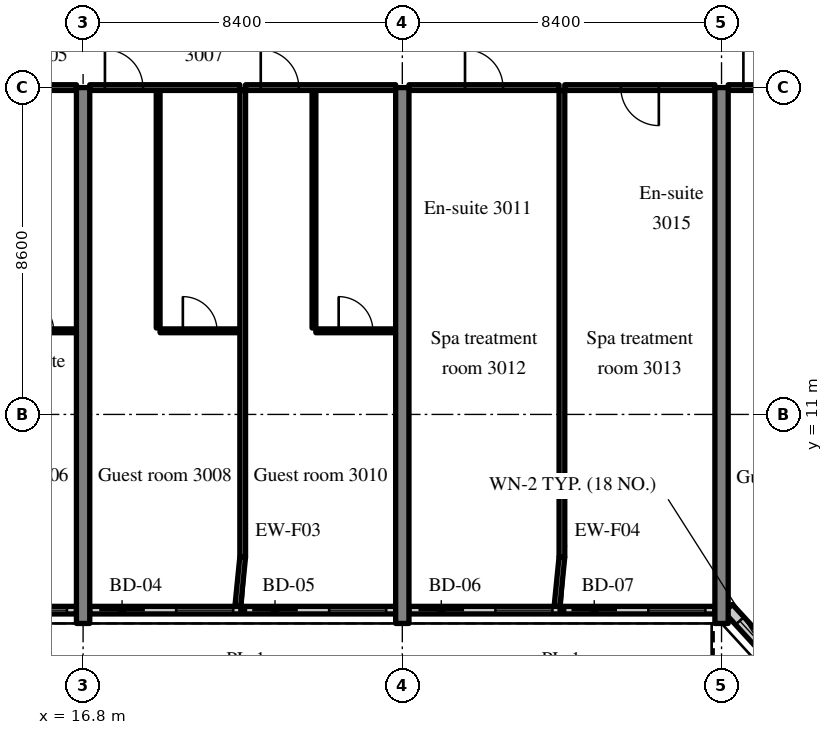
"""IFC4 building model, lengths in metres.
Left out: names, types, materials, properties, quantities, classifications, styles, units other than length and angle.
Written with IfcOpenShell. Run it as: python <this file> out.ifc"""

import sys

from ifc_helpers import new_model, si_unit, direction, frame, frame_2d, origin, place, context, subcontext, project, spatial, rectangle, extrude, source, transform, mapped, element, fill, save


model = new_model("IFC4")
c1 = context("Model", 3, precision=1e-05, world=origin(), true_north=direction((0.0, 1.0)))
c2 = subcontext(c1, "Body", "Model", "MODEL_VIEW")
j1 = project(units=[si_unit("LENGTHUNIT", "METRE"), si_unit("PLANEANGLEUNIT", "RADIAN")], contexts=[c1])
p1 = place(None, origin())
s1 = spatial("IfcSite", under=j1, at=p1, CompositionType="ELEMENT")
p2 = place(p1, origin())
s2 = spatial("IfcBuilding", under=s1, at=p2, CompositionType="ELEMENT")
p3 = place(p2, frame((0.0, 0.0, 125.6)))
s3 = spatial("IfcBuildingStorey", under=s2, at=p3, CompositionType="ELEMENT", Elevation=125.6)
m1 = source(origin(), c2, "Body", "SweptSolid", [
    extrude(rectangle(XDim=14.1, YDim=0.35, at=frame_2d((7.05, 0.0))), origin(), (0.0, 0.0, 1.0), 3.52),
])
for number, where, z_axis, x_axis in (
    (1, (16.8, 5.5, 0.0), (0.0, 0.0, 1.0), (0.0, 1.0, 0.0)),
    (2, (25.2, 5.5, 0.0), (0.0, 0.0, 1.0), (0.0, 1.0, 0.0)),
    (3, (33.6, 5.5, 0.0), (0.0, 0.0, 1.0), (0.0, 1.0, 0.0)),
):
    element("IfcWall", number, at=place(p3, frame(where, z_axis=z_axis, x_axis=x_axis)), inside=s3, PredefinedType="SHEAR", context=c2, shape_type="MappedRepresentation", body=[
        mapped(m1, transform((0.0, 0.0, 0.0), scale=1.0)),
    ])
m2 = source(origin(), c2, "Body", "SweptSolid", [
    extrude(rectangle(XDim=8.05, YDim=0.2, at=frame_2d((4.025, 0.0))), origin(), (0.0, 0.0, 1.0), 2.82),
])
p4 = place(p3, frame((8.575, 5.85, 0.0), z_axis=(0.0, 0.0, 1.0), x_axis=(1.0, 0.0, 0.0)))
e4 = element("IfcWall", 4, at=p4, inside=s3, PredefinedType="SOLIDWALL", context=c2, shape_type="MappedRepresentation", body=[
    mapped(m2, transform((0.0, 0.0, 0.0), scale=1.0)),
])
m3 = source(origin(), c2, "Body", "SweptSolid", [
    extrude(rectangle(XDim=1.2, YDim=2.4, at=frame_2d((0.6, 1.2))), frame((0.0, 0.11, 0.0), z_axis=(0.0, -1.0, 0.0), x_axis=(1.0, 0.0, 0.0)), (0.0, 0.0, 1.0), 0.22),
])
p5 = place(p4, frame((0.25, 0.0, 0.0)))
e5 = element("IfcOpeningElement", 5, at=p5, cuts=e4, PredefinedType="OPENING", context=c2, shape_type="MappedRepresentation", body=[
    mapped(m3, transform((0.0, 0.0, 0.0), scale=1.0)),
])
m4 = source(origin(), c2, "Body", "SweptSolid", [
    extrude(rectangle(XDim=1.5, YDim=1.5, at=frame_2d((0.75, 0.75))), frame((0.0, 0.11, 0.0), z_axis=(0.0, -1.0, 0.0), x_axis=(1.0, 0.0, 0.0)), (0.0, 0.0, 1.0), 0.22),
])
p6 = place(p4, frame((2.275, 0.0, 0.9)))
e6 = element("IfcOpeningElement", 6, at=p6, cuts=e4, PredefinedType="OPENING", context=c2, shape_type="MappedRepresentation", body=[
    mapped(m4, transform((0.0, 0.0, 0.0), scale=1.0)),
])
p7 = place(p4, frame((4.275, 0.0, 0.0)))
e7 = element("IfcOpeningElement", 7, at=p7, cuts=e4, PredefinedType="OPENING", context=c2, shape_type="MappedRepresentation", body=[
    mapped(m3, transform((0.0, 0.0, 0.0), scale=1.0)),
])
p8 = place(p4, frame((6.3, 0.0, 0.9)))
e8 = element("IfcOpeningElement", 8, at=p8, cuts=e4, PredefinedType="OPENING", context=c2, shape_type="MappedRepresentation", body=[
    mapped(m4, transform((0.0, 0.0, 0.0), scale=1.0)),
])
m5 = source(origin(), c2, "Body", "SweptSolid", [
    extrude(rectangle(XDim=8.05, YDim=0.2, at=frame_2d((4.025, 0.0))), origin(), (0.0, 0.0, 1.0), 2.82),
])
p9 = place(p3, frame((16.975, 5.85, 0.0), z_axis=(0.0, 0.0, 1.0), x_axis=(1.0, 0.0, 0.0)))
e9 = element("IfcWall", 9, at=p9, inside=s3, PredefinedType="SOLIDWALL", context=c2, shape_type="MappedRepresentation", body=[
    mapped(m5, transform((0.0, 0.0, 0.0), scale=1.0)),
])
p10 = place(p9, frame((0.25, 0.0, 0.0)))
e10 = element("IfcOpeningElement", 10, at=p10, cuts=e9, PredefinedType="OPENING", context=c2, shape_type="MappedRepresentation", body=[
    mapped(m3, transform((0.0, 0.0, 0.0), scale=1.0)),
])
p11 = place(p9, frame((2.275, 0.0, 0.9)))
e11 = element("IfcOpeningElement", 11, at=p11, cuts=e9, PredefinedType="OPENING", context=c2, shape_type="MappedRepresentation", body=[
    mapped(m4, transform((0.0, 0.0, 0.0), scale=1.0)),
])
p12 = place(p9, frame((4.275, 0.0, 0.0)))
e12 = element("IfcOpeningElement", 12, at=p12, cuts=e9, PredefinedType="OPENING", context=c2, shape_type="MappedRepresentation", body=[
    mapped(m3, transform((0.0, 0.0, 0.0), scale=1.0)),
])
p13 = place(p9, frame((6.3, 0.0, 0.9)))
e13 = element("IfcOpeningElement", 13, at=p13, cuts=e9, PredefinedType="OPENING", context=c2, shape_type="MappedRepresentation", body=[
    mapped(m4, transform((0.0, 0.0, 0.0), scale=1.0)),
])
p14 = place(p3, frame((25.375, 5.85, 0.0), z_axis=(0.0, 0.0, 1.0), x_axis=(1.0, 0.0, 0.0)))
e14 = element("IfcWall", 14, at=p14, inside=s3, PredefinedType="SOLIDWALL", context=c2, shape_type="MappedRepresentation", body=[
    mapped(m2, transform((0.0, 0.0, 0.0), scale=1.0)),
])
p15 = place(p14, frame((0.25, 0.0, 0.0)))
e15 = element("IfcOpeningElement", 15, at=p15, cuts=e14, PredefinedType="OPENING", context=c2, shape_type="MappedRepresentation", body=[
    mapped(m3, transform((0.0, 0.0, 0.0), scale=1.0)),
])
p16 = place(p14, frame((2.275, 0.0, 0.9)))
e16 = element("IfcOpeningElement", 16, at=p16, cuts=e14, PredefinedType="OPENING", context=c2, shape_type="MappedRepresentation", body=[
    mapped(m4, transform((0.0, 0.0, 0.0), scale=1.0)),
])
p17 = place(p14, frame((4.275, 0.0, 0.0)))
e17 = element("IfcOpeningElement", 17, at=p17, cuts=e14, PredefinedType="OPENING", context=c2, shape_type="MappedRepresentation", body=[
    mapped(m3, transform((0.0, 0.0, 0.0), scale=1.0)),
])
p18 = place(p14, frame((6.3, 0.0, 0.9)))
e18 = element("IfcOpeningElement", 18, at=p18, cuts=e14, PredefinedType="OPENING", context=c2, shape_type="MappedRepresentation", body=[
    mapped(m4, transform((0.0, 0.0, 0.0), scale=1.0)),
])
m6 = source(origin(), c2, "Body", "SweptSolid", [
    extrude(rectangle(XDim=2.398, YDim=0.3, at=frame_2d((1.199, 0.0))), origin(), (0.0, 0.0, 1.0), 3.52),
])
p19 = place(p3, frame((33.776, 5.9, 0.0), z_axis=(0.0, 0.0, 1.0), x_axis=(0.675374189419, -0.737475222815, 0.0)))
e19 = element("IfcWall", 19, at=p19, inside=s3, PredefinedType="SOLIDWALL", context=c2, shape_type="MappedRepresentation", body=[
    mapped(m6, transform((0.0, 0.0, 0.0), scale=1.0)),
])
m7 = source(origin(), c2, "Body", "SweptSolid", [
    extrude(rectangle(XDim=1.5, YDim=2.0, at=frame_2d((0.75, 1.0))), frame((0.0, 0.16, 0.0), z_axis=(0.0, -1.0, 0.0), x_axis=(1.0, 0.0, 0.0)), (0.0, 0.0, 1.0), 0.32),
])
p20 = place(p19, frame((0.449, 0.0, 0.9)))
e20 = element("IfcOpeningElement", 20, at=p20, cuts=e19, PredefinedType="OPENING", context=c2, shape_type="MappedRepresentation", body=[
    mapped(m7, transform((0.0, 0.0, 0.0), scale=1.0)),
])
m8 = source(origin(), c2, "Body", "SweptSolid", [
    extrude(rectangle(XDim=2.1, YDim=0.1, at=frame_2d((1.05, 0.0))), origin(), (0.0, 0.0, 1.0), 3.52),
])
p21 = place(p3, frame((14.525, 13.2, 0.0), z_axis=(0.0, 0.0, 1.0), x_axis=(1.0, 0.0, 0.0)))
e21 = element("IfcWall", 21, at=p21, inside=s3, PredefinedType="PARTITIONING", context=c2, shape_type="MappedRepresentation", body=[
    mapped(m8, transform((0.0, 0.0, 0.0), scale=1.0)),
])
m9 = source(origin(), c2, "Body", "SweptSolid", [
    extrude(rectangle(XDim=0.9, YDim=2.1, at=frame_2d((0.45, 1.05))), frame((0.0, 0.06, 0.0), z_axis=(0.0, -1.0, 0.0), x_axis=(1.0, 0.0, 0.0)), (0.0, 0.0, 1.0), 0.12),
])
p22 = place(p21, frame((0.6, 0.0, 0.0)))
e22 = element("IfcOpeningElement", 22, at=p22, cuts=e21, PredefinedType="OPENING", context=c2, shape_type="MappedRepresentation", body=[
    mapped(m9, transform((0.0, 0.0, 0.0), scale=1.0)),
])
m10 = source(origin(), c2, "Body", "SweptSolid", [
    extrude(rectangle(XDim=3.95, YDim=0.15, at=frame_2d((1.975, 0.0))), origin(), (0.0, 0.0, 1.0), 2.82),
])
p23 = place(p3, frame((12.675, 19.6, 0.0), z_axis=(0.0, 0.0, 1.0), x_axis=(1.0, 0.0, 0.0)))
e23 = element("IfcWall", 23, at=p23, inside=s3, PredefinedType="PARTITIONING", context=c2, shape_type="MappedRepresentation", body=[
    mapped(m10, transform((0.0, 0.0, 0.0), scale=1.0)),
])
m11 = source(origin(), c2, "Body", "SweptSolid", [
    extrude(rectangle(XDim=1.0, YDim=2.1, at=frame_2d((0.5, 1.05))), frame((0.0, 0.085, 0.0), z_axis=(0.0, -1.0, 0.0), x_axis=(1.0, 0.0, 0.0)), (0.0, 0.0, 1.0), 0.17),
])
p24 = place(p23, frame((0.4, 0.0, 0.0)))
e24 = element("IfcOpeningElement", 24, at=p24, cuts=e23, PredefinedType="OPENING", context=c2, shape_type="MappedRepresentation", body=[
    mapped(m11, transform((0.0, 0.0, 0.0), scale=1.0)),
])
m12 = source(origin(), c2, "Body", "SweptSolid", [
    extrude(rectangle(XDim=6.25, YDim=0.1, at=frame_2d((3.125, 0.0))), origin(), (0.0, 0.0, 1.0), 3.52),
])
p25 = place(p3, frame((18.775, 13.275, 0.0), z_axis=(0.0, 0.0, 1.0), x_axis=(0.0, 1.0, 0.0)))
e25 = element("IfcWall", 25, at=p25, inside=s3, PredefinedType="PARTITIONING", context=c2, shape_type="MappedRepresentation", body=[
    mapped(m12, transform((0.0, 0.0, 0.0), scale=1.0)),
])
p26 = place(p3, frame((18.825, 13.2, 0.0), z_axis=(0.0, 0.0, 1.0), x_axis=(1.0, 0.0, 0.0)))
e26 = element("IfcWall", 26, at=p26, inside=s3, PredefinedType="PARTITIONING", context=c2, shape_type="MappedRepresentation", body=[
    mapped(m8, transform((0.0, 0.0, 0.0), scale=1.0)),
])
p27 = place(p26, frame((0.6, 0.0, 0.0)))
e27 = element("IfcOpeningElement", 27, at=p27, cuts=e26, PredefinedType="OPENING", context=c2, shape_type="MappedRepresentation", body=[
    mapped(m9, transform((0.0, 0.0, 0.0), scale=1.0)),
])
p28 = place(p3, frame((16.975, 19.6, 0.0), z_axis=(0.0, 0.0, 1.0), x_axis=(1.0, 0.0, 0.0)))
e28 = element("IfcWall", 28, at=p28, inside=s3, PredefinedType="PARTITIONING", context=c2, shape_type="MappedRepresentation", body=[
    mapped(m10, transform((0.0, 0.0, 0.0), scale=1.0)),
])
p29 = place(p28, frame((0.4, 0.0, 0.0)))
e29 = element("IfcOpeningElement", 29, at=p29, cuts=e28, PredefinedType="OPENING", context=c2, shape_type="MappedRepresentation", body=[
    mapped(m11, transform((0.0, 0.0, 0.0), scale=1.0)),
])
p30 = place(p3, frame((22.875, 13.275, 0.0), z_axis=(0.0, 0.0, 1.0), x_axis=(0.0, 1.0, 0.0)))
e30 = element("IfcWall", 30, at=p30, inside=s3, PredefinedType="PARTITIONING", context=c2, shape_type="MappedRepresentation", body=[
    mapped(m12, transform((0.0, 0.0, 0.0), scale=1.0)),
])
m13 = source(origin(), c2, "Body", "SweptSolid", [
    extrude(rectangle(XDim=2.1, YDim=0.1, at=frame_2d((1.05, 0.0))), origin(), (0.0, 0.0, 1.0), 3.52),
])
p31 = place(p3, frame((22.925, 13.2, 0.0), z_axis=(0.0, 0.0, 1.0), x_axis=(1.0, 0.0, 0.0)))
e31 = element("IfcWall", 31, at=p31, inside=s3, PredefinedType="PARTITIONING", context=c2, shape_type="MappedRepresentation", body=[
    mapped(m13, transform((0.0, 0.0, 0.0), scale=1.0)),
])
p32 = place(p31, frame((0.6, 0.0, 0.0)))
e32 = element("IfcOpeningElement", 32, at=p32, cuts=e31, PredefinedType="OPENING", context=c2, shape_type="MappedRepresentation", body=[
    mapped(m9, transform((0.0, 0.0, 0.0), scale=1.0)),
])
p33 = place(p3, frame((21.075, 19.6, 0.0), z_axis=(0.0, 0.0, 1.0), x_axis=(1.0, 0.0, 0.0)))
e33 = element("IfcWall", 33, at=p33, inside=s3, PredefinedType="PARTITIONING", context=c2, shape_type="MappedRepresentation", body=[
    mapped(m10, transform((0.0, 0.0, 0.0), scale=1.0)),
])
p34 = place(p33, frame((0.4, 0.0, 0.0)))
e34 = element("IfcOpeningElement", 34, at=p34, cuts=e33, PredefinedType="OPENING", context=c2, shape_type="MappedRepresentation", body=[
    mapped(m11, transform((0.0, 0.0, 0.0), scale=1.0)),
])
m14 = source(origin(), c2, "Body", "SweptSolid", [
    extrude(rectangle(XDim=12.275, YDim=0.15, at=frame_2d((6.137, 0.0))), origin(), (0.0, 0.0, 1.0), 3.52),
])
p35 = place(p3, frame((21.0, 7.25, 0.0), z_axis=(0.0, 0.0, 1.0), x_axis=(0.0, 1.0, 0.0)))
e35 = element("IfcWall", 35, at=p35, inside=s3, PredefinedType="PARTITIONING", context=c2, shape_type="MappedRepresentation", body=[
    mapped(m14, transform((0.0, 0.0, 0.0), scale=1.0)),
])
p36 = place(p3, frame((25.375, 19.6, 0.0), z_axis=(0.0, 0.0, 1.0), x_axis=(1.0, 0.0, 0.0)))
e36 = element("IfcWall", 36, at=p36, inside=s3, PredefinedType="PARTITIONING", context=c2, shape_type="MappedRepresentation", body=[
    mapped(m10, transform((0.0, 0.0, 0.0), scale=1.0)),
])
p37 = place(p36, frame((1.475, 0.0, 0.0)))
e37 = element("IfcOpeningElement", 37, at=p37, cuts=e36, PredefinedType="OPENING", context=c2, shape_type="MappedRepresentation", body=[
    mapped(m11, transform((0.0, 0.0, 0.0), scale=1.0)),
])
p38 = place(p3, frame((29.475, 19.6, 0.0), z_axis=(0.0, 0.0, 1.0), x_axis=(1.0, 0.0, 0.0)))
e38 = element("IfcWall", 38, at=p38, inside=s3, PredefinedType="PARTITIONING", context=c2, shape_type="MappedRepresentation", body=[
    mapped(m10, transform((0.0, 0.0, 0.0), scale=1.0)),
])
p39 = place(p38, frame((1.475, 0.0, 0.0)))
e39 = element("IfcOpeningElement", 39, at=p39, cuts=e38, PredefinedType="OPENING", context=c2, shape_type="MappedRepresentation", body=[
    mapped(m11, transform((0.0, 0.0, 0.0), scale=1.0)),
])
p40 = place(p3, frame((29.4, 7.25, 0.0), z_axis=(0.0, 0.0, 1.0), x_axis=(0.0, 1.0, 0.0)))
e40 = element("IfcWall", 40, at=p40, inside=s3, PredefinedType="PARTITIONING", context=c2, shape_type="MappedRepresentation", body=[
    mapped(m14, transform((0.0, 0.0, 0.0), scale=1.0)),
])
m15 = source(origin(), c2, "Body", "SweptSolid", [
    extrude(rectangle(XDim=3.95, YDim=0.15, at=frame_2d((1.975, 0.0))), origin(), (0.0, 0.0, 1.0), 2.82),
])
p41 = place(p3, frame((33.775, 19.6, 0.0), z_axis=(0.0, 0.0, 1.0), x_axis=(1.0, 0.0, 0.0)))
e41 = element("IfcWall", 41, at=p41, inside=s3, PredefinedType="PARTITIONING", context=c2, shape_type="MappedRepresentation", body=[
    mapped(m15, transform((0.0, 0.0, 0.0), scale=1.0)),
])
p42 = place(p41, frame((0.4, 0.0, 0.0)))
e42 = element("IfcOpeningElement", 42, at=p42, cuts=e41, PredefinedType="OPENING", context=c2, shape_type="MappedRepresentation", body=[
    mapped(m11, transform((0.0, 0.0, 0.0), scale=1.0)),
])
m16 = source(origin(), c2, "Body", "SweptSolid", [
    extrude(rectangle(XDim=1.307, YDim=0.15, at=frame_2d((0.653, 0.0))), origin(), (0.0, 0.0, 1.0), 3.52),
])
for number, where, z_axis, x_axis in (
    (43, (20.87, 5.95, 0.0), (0.0, 0.0, 1.0), (0.099, 0.995, 0.0)),
    (44, (29.27, 5.95, 0.0), (0.0, 0.0, 1.0), (0.099, 0.995, 0.0)),
):
    element("IfcWall", number, at=place(p3, frame(where, z_axis=z_axis, x_axis=x_axis)), inside=s3, PredefinedType="PARTITIONING", context=c2, shape_type="MappedRepresentation", body=[
        mapped(m16, transform((0.0, 0.0, 0.0), scale=1.0)),
    ])
m17 = source(origin(), c2, "Body", "SweptSolid", [
    extrude(rectangle(XDim=1.5, YDim=1.5, at=frame_2d((0.75, 0.75))), frame((0.0, 0.03, 0.0), z_axis=(0.0, -1.0, 0.0), x_axis=(1.0, 0.0, 0.0)), (0.0, 0.0, 1.0), 0.06),
])
p43 = place(p8, origin())
e45 = element("IfcWindow", 45, at=p43, inside=s3, PartitioningType="SINGLE_PANEL", PredefinedType="WINDOW", context=c2, shape_type="MappedRepresentation", body=[
    mapped(m17, transform((0.0, 0.0, 0.0), scale=1.0)),
])
fill(e8, e45)
m18 = source(origin(), c2, "Body", "SweptSolid", [
    extrude(rectangle(XDim=1.2, YDim=2.4, at=frame_2d((0.6, 1.2))), frame((0.0, 0.025, 0.0), z_axis=(0.0, -1.0, 0.0), x_axis=(1.0, 0.0, 0.0)), (0.0, 0.0, 1.0), 0.05),
])
p44 = place(p10, origin())
e46 = element("IfcDoor", 46, at=p44, inside=s3, OperationType="SLIDING_TO_RIGHT", PredefinedType="DOOR", context=c2, shape_type="MappedRepresentation", body=[
    mapped(m18, transform((0.0, 0.0, 0.0), scale=1.0)),
])
fill(e10, e46)
p45 = place(p11, origin())
e47 = element("IfcWindow", 47, at=p45, inside=s3, PartitioningType="SINGLE_PANEL", PredefinedType="WINDOW", context=c2, shape_type="MappedRepresentation", body=[
    mapped(m17, transform((0.0, 0.0, 0.0), scale=1.0)),
])
fill(e11, e47)
p46 = place(p12, origin())
e48 = element("IfcDoor", 48, at=p46, inside=s3, OperationType="SLIDING_TO_LEFT", PredefinedType="DOOR", context=c2, shape_type="MappedRepresentation", body=[
    mapped(m18, transform((0.0, 0.0, 0.0), scale=1.0)),
])
fill(e12, e48)
p47 = place(p13, origin())
e49 = element("IfcWindow", 49, at=p47, inside=s3, PartitioningType="SINGLE_PANEL", PredefinedType="WINDOW", context=c2, shape_type="MappedRepresentation", body=[
    mapped(m17, transform((0.0, 0.0, 0.0), scale=1.0)),
])
fill(e13, e49)
p48 = place(p15, origin())
e50 = element("IfcDoor", 50, at=p48, inside=s3, OperationType="SLIDING_TO_RIGHT", PredefinedType="DOOR", context=c2, shape_type="MappedRepresentation", body=[
    mapped(m18, transform((0.0, 0.0, 0.0), scale=1.0)),
])
fill(e15, e50)
p49 = place(p16, origin())
e51 = element("IfcWindow", 51, at=p49, inside=s3, PartitioningType="SINGLE_PANEL", PredefinedType="WINDOW", context=c2, shape_type="MappedRepresentation", body=[
    mapped(m17, transform((0.0, 0.0, 0.0), scale=1.0)),
])
fill(e16, e51)
p50 = place(p17, origin())
e52 = element("IfcDoor", 52, at=p50, inside=s3, OperationType="SLIDING_TO_LEFT", PredefinedType="DOOR", context=c2, shape_type="MappedRepresentation", body=[
    mapped(m18, transform((0.0, 0.0, 0.0), scale=1.0)),
])
fill(e17, e52)
p51 = place(p18, origin())
e53 = element("IfcWindow", 53, at=p51, inside=s3, PartitioningType="SINGLE_PANEL", PredefinedType="WINDOW", context=c2, shape_type="MappedRepresentation", body=[
    mapped(m17, transform((0.0, 0.0, 0.0), scale=1.0)),
])
fill(e18, e53)
m19 = source(origin(), c2, "Body", "SweptSolid", [
    extrude(rectangle(XDim=1.5, YDim=2.0, at=frame_2d((0.75, 1.0))), frame((0.0, 0.03, 0.0), z_axis=(0.0, -1.0, 0.0), x_axis=(1.0, 0.0, 0.0)), (0.0, 0.0, 1.0), 0.06),
])
p52 = place(p20, origin())
e54 = element("IfcWindow", 54, at=p52, inside=s3, PartitioningType="SINGLE_PANEL", PredefinedType="WINDOW", context=c2, shape_type="MappedRepresentation", body=[
    mapped(m19, transform((0.0, 0.0, 0.0), scale=1.0)),
])
fill(e20, e54)
m20 = source(origin(), c2, "Body", "SweptSolid", [
    extrude(rectangle(XDim=0.9, YDim=2.1, at=frame_2d((0.45, 1.05))), frame((0.0, 0.025, 0.0), z_axis=(0.0, -1.0, 0.0), x_axis=(1.0, 0.0, 0.0)), (0.0, 0.0, 1.0), 0.05),
])
p53 = place(p22, origin())
e55 = element("IfcDoor", 55, at=p53, inside=s3, OperationType="SINGLE_SWING_LEFT", PredefinedType="DOOR", context=c2, shape_type="MappedRepresentation", body=[
    mapped(m20, transform((0.0, 0.0, 0.0), scale=1.0)),
])
fill(e22, e55)
p54 = place(p27, origin())
e56 = element("IfcDoor", 56, at=p54, inside=s3, OperationType="SINGLE_SWING_LEFT", PredefinedType="DOOR", context=c2, shape_type="MappedRepresentation", body=[
    mapped(m20, transform((0.0, 0.0, 0.0), scale=1.0)),
])
fill(e27, e56)
m21 = source(origin(), c2, "Body", "SweptSolid", [
    extrude(rectangle(XDim=1.0, YDim=2.1, at=frame_2d((0.5, 1.05))), frame((0.0, 0.025, 0.0), z_axis=(0.0, -1.0, 0.0), x_axis=(1.0, 0.0, 0.0)), (0.0, 0.0, 1.0), 0.05),
])
p55 = place(p29, origin())
e57 = element("IfcDoor", 57, at=p55, inside=s3, OperationType="SINGLE_SWING_LEFT", PredefinedType="DOOR", context=c2, shape_type="MappedRepresentation", body=[
    mapped(m21, transform((0.0, 0.0, 0.0), scale=1.0)),
])
fill(e29, e57)
p56 = place(p32, origin())
e58 = element("IfcDoor", 58, at=p56, inside=s3, OperationType="SINGLE_SWING_LEFT", PredefinedType="DOOR", context=c2, shape_type="MappedRepresentation", body=[
    mapped(m20, transform((0.0, 0.0, 0.0), scale=1.0)),
])
fill(e32, e58)
p57 = place(p34, origin())
e59 = element("IfcDoor", 59, at=p57, inside=s3, OperationType="SINGLE_SWING_LEFT", PredefinedType="DOOR", context=c2, shape_type="MappedRepresentation", body=[
    mapped(m21, transform((0.0, 0.0, 0.0), scale=1.0)),
])
fill(e34, e59)
p58 = place(p37, origin())
e60 = element("IfcDoor", 60, at=p58, inside=s3, OperationType="SINGLE_SWING_LEFT", PredefinedType="DOOR", context=c2, shape_type="MappedRepresentation", body=[
    mapped(m21, transform((0.0, 0.0, 0.0), scale=1.0)),
])
fill(e37, e60)
p59 = place(p39, origin())
e61 = element("IfcDoor", 61, at=p59, inside=s3, OperationType="SINGLE_SWING_RIGHT", PredefinedType="DOOR", context=c2, shape_type="MappedRepresentation", body=[
    mapped(m21, transform((0.0, 0.0, 0.0), scale=1.0)),
])
fill(e39, e61)
p60 = place(p42, origin())
e62 = element("IfcDoor", 62, at=p60, inside=s3, OperationType="SINGLE_SWING_LEFT", PredefinedType="DOOR", context=c2, shape_type="MappedRepresentation", body=[
    mapped(m21, transform((0.0, 0.0, 0.0), scale=1.0)),
])
fill(e42, e62)
save(model, sys.argv[1])
